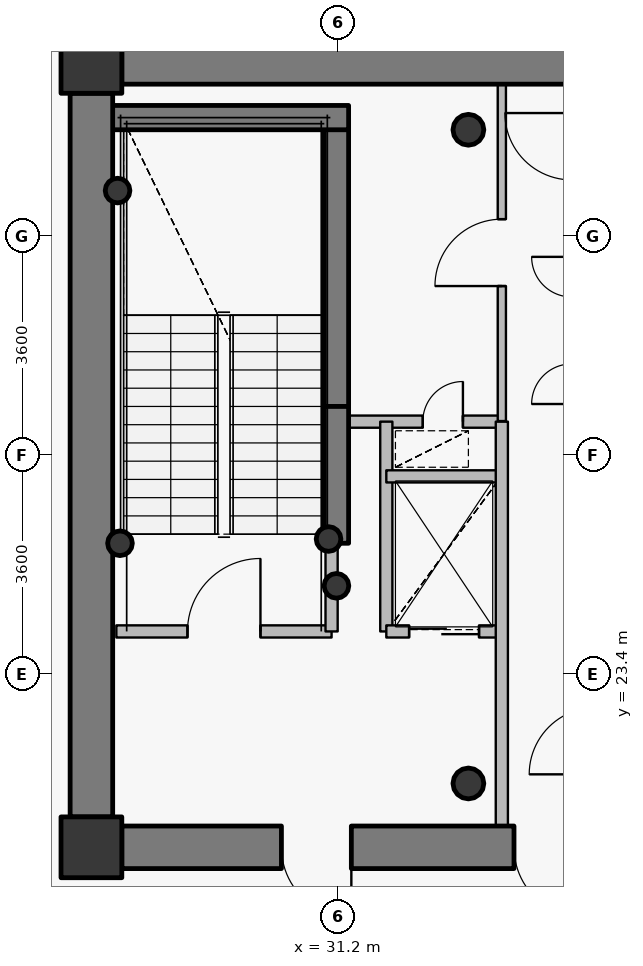
"""IFC4 building model, lengths in metres.
Left out: names, types, materials, properties, quantities, classifications, styles, units other than length and angle.
Written with IfcOpenShell. Run it as: python <this file> out.ifc"""

import sys

from ifc_helpers import new_model, si_unit, direction, frame, frame_2d, origin, origin_2d, place, context, subcontext, project, spatial, rectangle, hollow_circle, extrude, source, transform, mapped, element, fill, save


model = new_model("IFC4")
c1 = context("Model", 3, precision=1e-05, world=origin(), true_north=direction((0.0, 1.0)))
c2 = subcontext(c1, "Body", "Model", "MODEL_VIEW")
j1 = project(units=[si_unit("LENGTHUNIT", "METRE"), si_unit("PLANEANGLEUNIT", "RADIAN")], contexts=[c1])
p1 = place(None, origin())
s1 = spatial("IfcSite", under=j1, at=p1, CompositionType="ELEMENT")
p2 = place(p1, origin())
s2 = spatial("IfcBuilding", under=s1, at=p2, CompositionType="ELEMENT")
p3 = place(p2, frame((0.0, 0.0, 310.5)))
s3 = spatial("IfcBuildingStorey", under=s2, at=p3, CompositionType="ELEMENT", Elevation=310.5)
for number, where, z_axis, x_axis in (
    (1, (27.15, 20.55, 0.0), (0.0, 0.0, 1.0), (1.0, 0.0, 0.0)),
    (2, (27.15, 33.45, 0.0), (0.0, 0.0, 1.0), (1.0, 0.0, 0.0)),
):
    element("IfcColumn", number, at=place(p3, frame(where, z_axis=z_axis, x_axis=x_axis)), inside=s3, PredefinedType="COLUMN", context=c2, shape_type="SweptSolid", body=[
        extrude(rectangle(XDim=1.0, YDim=1.0, at=origin_2d()), origin(), (0.0, 0.0, 1.0), 3.75),
    ])
for number, where, z_axis, x_axis in (
    (3, (33.35, 21.6, 0.0), (0.0, 0.0, 1.0), (1.0, 0.0, 0.0)),
    (4, (33.35, 32.35, 0.0), (0.0, 0.0, 1.0), (1.0, 0.0, 0.0)),
):
    element("IfcColumn", number, at=place(p3, frame(where, z_axis=z_axis, x_axis=x_axis)), inside=s3, PredefinedType="COLUMN", context=c2, shape_type="SweptSolid", body=[
        extrude(hollow_circle(Radius=0.254, WallThickness=0.02, at=origin_2d()), origin(), (0.0, 0.0, 1.0), 3.75),
    ])
p4 = place(p3, frame((31.18, 27.8, 0.0), z_axis=(0.0, 0.0, 1.0), x_axis=(0.0, 1.0, 0.0)))
e5 = element("IfcWall", 5, at=p4, inside=s3, PredefinedType="SHEAR", context=c2, shape_type="SweptSolid", body=[
    extrude(rectangle(XDim=4.75, YDim=0.4, at=frame_2d((2.375, 0.0))), origin(), (0.0, 0.0, 1.0), 3.75),
])
p5 = place(p3, frame((27.25, 32.55, 0.0), z_axis=(0.0, 0.0, 1.0), x_axis=(1.0, 0.0, 0.0)))
e6 = element("IfcWall", 6, at=p5, inside=s3, PredefinedType="SHEAR", context=c2, shape_type="SweptSolid", body=[
    extrude(rectangle(XDim=4.13, YDim=0.4, at=frame_2d((2.065, 0.0))), origin(), (0.0, 0.0, 1.0), 3.75),
])
for number, where, z_axis, x_axis in (
    (7, (27.58, 31.35, 0.0), (0.0, 0.0, 1.0), (1.0, 0.0, 0.0)),
    (8, (31.05, 25.62, 0.0), (0.0, 0.0, 1.0), (1.0, 0.0, 0.0)),
    (9, (31.18, 24.85, 0.0), (0.0, 0.0, 1.0), (1.0, 0.0, 0.0)),
    (10, (27.62, 25.55, 0.0), (0.0, 0.0, 1.0), (1.0, 0.0, 0.0)),
):
    element("IfcColumn", number, at=place(p3, frame(where, z_axis=z_axis, x_axis=x_axis)), inside=s3, PredefinedType="COLUMN", context=c2, shape_type="SweptSolid", body=[
        extrude(hollow_circle(Radius=0.203, WallThickness=0.016, at=origin_2d()), origin(), (0.0, 0.0, 1.0), 3.75),
    ])
p6 = place(p3, frame((27.65, 33.45, 0.0), z_axis=(0.0, 0.0, 1.0), x_axis=(1.0, 0.0, 0.0)))
e11 = element("IfcWall", 11, at=p6, inside=s3, PredefinedType="SHEAR", context=c2, shape_type="SweptSolid", body=[
    extrude(rectangle(XDim=16.7, YDim=0.7, at=frame_2d((8.35, 0.0))), origin(), (0.0, 0.0, 1.0), 3.05),
])
p7 = place(p6, frame((12.775, 0.0, 0.0)))
e12 = element("IfcOpeningElement", 12, at=p7, cuts=e11, PredefinedType="OPENING", context=c2, shape_type="SweptSolid", body=[
    extrude(rectangle(XDim=1.15, YDim=2.15, at=origin_2d()), frame((0.575, 0.36, 1.075), z_axis=(0.0, -1.0, 0.0), x_axis=(1.0, 0.0, 0.0)), (0.0, 0.0, 1.0), 0.72),
])
p8 = place(p3, frame((44.35, 20.55, 0.0), z_axis=(0.0, 0.0, 1.0), x_axis=(-1.0, 0.0, 0.0)))
e13 = element("IfcWall", 13, at=p8, inside=s3, PredefinedType="SHEAR", context=c2, shape_type="SweptSolid", body=[
    extrude(rectangle(XDim=16.7, YDim=0.7, at=frame_2d((8.35, 0.0))), origin(), (0.0, 0.0, 1.0), 3.05),
])
p9 = place(p8, frame((12.925, 0.0, 0.0)))
e14 = element("IfcOpeningElement", 14, at=p9, cuts=e13, PredefinedType="OPENING", context=c2, shape_type="SweptSolid", body=[
    extrude(rectangle(XDim=1.15, YDim=2.15, at=origin_2d()), frame((0.575, 0.36, 1.075), z_axis=(0.0, -1.0, 0.0), x_axis=(1.0, 0.0, 0.0)), (0.0, 0.0, 1.0), 0.72),
])
p10 = place(p8, frame((9.1, 0.0, 0.0)))
e15 = element("IfcOpeningElement", 15, at=p10, cuts=e13, PredefinedType="OPENING", context=c2, shape_type="SweptSolid", body=[
    extrude(rectangle(XDim=1.15, YDim=2.15, at=origin_2d()), frame((0.575, 0.36, 1.075), z_axis=(0.0, -1.0, 0.0), x_axis=(1.0, 0.0, 0.0)), (0.0, 0.0, 1.0), 0.72),
])
p11 = place(p3, frame((27.15, 21.05, 0.0), z_axis=(0.0, 0.0, 1.0), x_axis=(0.0, 1.0, 0.0)))
e16 = element("IfcWall", 16, at=p11, inside=s3, PredefinedType="SHEAR", context=c2, shape_type="SweptSolid", body=[
    extrude(rectangle(XDim=11.9, YDim=0.7, at=frame_2d((5.95, 0.0))), origin(), (0.0, 0.0, 1.0), 3.05),
])
p12 = place(p3, frame((31.18, 25.55, 0.0), z_axis=(0.0, 0.0, 1.0), x_axis=(0.0, 1.0, 0.0)))
e17 = element("IfcWall", 17, at=p12, inside=s3, PredefinedType="SHEAR", context=c2, shape_type="SweptSolid", body=[
    extrude(rectangle(XDim=2.25, YDim=0.4, at=frame_2d((1.125, 0.0))), origin(), (0.0, 0.0, 1.0), 3.1),
])
p13 = place(p3, frame((27.56, 24.1, 0.0), z_axis=(0.0, 0.0, 1.0), x_axis=(1.0, 0.0, 0.0)))
e18 = element("IfcWall", 18, at=p13, inside=s3, PredefinedType="PARTITIONING", context=c2, shape_type="SweptSolid", body=[
    extrude(rectangle(XDim=3.54, YDim=0.2, at=frame_2d((1.77, 0.0))), origin(), (0.0, 0.0, 1.0), 3.5),
])
p14 = place(p13, frame((1.17, 0.0, 0.0)))
e19 = element("IfcOpeningElement", 19, at=p14, cuts=e18, PredefinedType="OPENING", context=c2, shape_type="SweptSolid", body=[
    extrude(rectangle(XDim=1.2, YDim=2.15, at=origin_2d()), frame((0.6, 0.11, 1.075), z_axis=(0.0, -1.0, 0.0), x_axis=(1.0, 0.0, 0.0)), (0.0, 0.0, 1.0), 0.22),
])
p15 = place(p3, frame((31.1, 24.1, 0.0), z_axis=(0.0, 0.0, 1.0), x_axis=(0.0, 1.0, 0.0)))
e20 = element("IfcWall", 20, at=p15, inside=s3, PredefinedType="PARTITIONING", context=c2, shape_type="SweptSolid", body=[
    extrude(rectangle(XDim=1.44, YDim=0.2, at=frame_2d((0.72, 0.0))), origin(), (0.0, 0.0, 1.0), 3.5),
])
p16 = place(p3, frame((31.1, 27.55, 0.0), z_axis=(0.0, 0.0, 1.0), x_axis=(1.0, 0.0, 0.0)))
e21 = element("IfcWall", 21, at=p16, inside=s3, PredefinedType="PARTITIONING", context=c2, shape_type="SweptSolid", body=[
    extrude(rectangle(XDim=2.8, YDim=0.2, at=frame_2d((1.4, 0.0))), origin(), (0.0, 0.0, 1.0), 3.085),
])
p17 = place(p16, frame((1.5, 0.0, 0.0)))
e22 = element("IfcOpeningElement", 22, at=p17, cuts=e21, PredefinedType="OPENING", context=c2, shape_type="SweptSolid", body=[
    extrude(rectangle(XDim=0.66, YDim=2.05, at=origin_2d()), frame((0.33, 0.11, 1.025), z_axis=(0.0, -1.0, 0.0), x_axis=(1.0, 0.0, 0.0)), (0.0, 0.0, 1.0), 0.22),
])
p18 = place(p3, frame((32.0, 24.1, 0.0), z_axis=(0.0, 0.0, 1.0), x_axis=(0.0, 1.0, 0.0)))
e23 = element("IfcWall", 23, at=p18, inside=s3, PredefinedType="PARTITIONING", context=c2, shape_type="SweptSolid", body=[
    extrude(rectangle(XDim=3.45, YDim=0.2, at=frame_2d((1.725, 0.0))), origin(), (0.0, 0.0, 1.0), 3.5),
])
p19 = place(p3, frame((32.0, 24.1, 0.0), z_axis=(0.0, 0.0, 1.0), x_axis=(1.0, 0.0, 0.0)))
e24 = element("IfcWall", 24, at=p19, inside=s3, PredefinedType="PARTITIONING", context=c2, shape_type="SweptSolid", body=[
    extrude(rectangle(XDim=1.9, YDim=0.2, at=frame_2d((0.95, 0.0))), origin(), (0.0, 0.0, 1.0), 3.085),
])
p20 = place(p19, frame((0.375, 0.0, 0.0)))
e25 = element("IfcOpeningElement", 25, at=p20, cuts=e24, PredefinedType="OPENING", context=c2, shape_type="SweptSolid", body=[
    extrude(rectangle(XDim=1.15, YDim=2.15, at=origin_2d()), frame((0.575, 0.11, 1.075), z_axis=(0.0, -1.0, 0.0), x_axis=(1.0, 0.0, 0.0)), (0.0, 0.0, 1.0), 0.22),
])
p21 = place(p3, frame((32.0, 26.65, 0.0), z_axis=(0.0, 0.0, 1.0), x_axis=(1.0, 0.0, 0.0)))
e26 = element("IfcWall", 26, at=p21, inside=s3, PredefinedType="PARTITIONING", context=c2, shape_type="SweptSolid", body=[
    extrude(rectangle(XDim=1.9, YDim=0.2, at=frame_2d((0.95, 0.0))), origin(), (0.0, 0.0, 1.0), 3.085),
])
p22 = place(p3, frame((33.9, 20.9, 0.0), z_axis=(0.0, 0.0, 1.0), x_axis=(0.0, 1.0, 0.0)))
e27 = element("IfcWall", 27, at=p22, inside=s3, PredefinedType="PARTITIONING", context=c2, shape_type="SweptSolid", body=[
    extrude(rectangle(XDim=6.65, YDim=0.2, at=frame_2d((3.325, 0.0))), origin(), (0.0, 0.0, 1.0), 3.085),
])
p23 = place(p3, frame((33.9, 27.56, 0.0), z_axis=(0.0, 0.0, 1.0), x_axis=(0.0, 1.0, 0.0)))
e28 = element("IfcWall", 28, at=p23, inside=s3, PredefinedType="PARTITIONING", context=c2, shape_type="SweptSolid", body=[
    extrude(rectangle(XDim=5.54, YDim=0.135, at=frame_2d((2.77, 0.0))), origin(), (0.0, 0.0, 1.0), 3.085),
])
p24 = place(p23, frame((2.22, 0.0, 0.0)))
e29 = element("IfcOpeningElement", 29, at=p24, cuts=e28, PredefinedType="OPENING", context=c2, shape_type="SweptSolid", body=[
    extrude(rectangle(XDim=1.1, YDim=2.15, at=origin_2d()), frame((0.55, 0.078, 1.075), z_axis=(0.0, -1.0, 0.0), x_axis=(1.0, 0.0, 0.0)), (0.0, 0.0, 1.0), 0.155),
])
p25 = place(p3, frame((26.8, 33.492, 0.0), z_axis=(0.0, 0.0, 1.0), x_axis=(0.0, -1.0, 0.0)))
e30 = element("IfcWall", 30, at=p25, inside=s3, PredefinedType="PARTITIONING", context=c2, shape_type="SweptSolid", body=[
    extrude(rectangle(XDim=0.532, YDim=0.135, at=frame_2d((0.266, 0.0))), origin(), (0.0, 0.0, 1.0), 3.5),
])
p26 = place(p3, frame((26.8, 21.04, 0.0), z_axis=(0.0, 0.0, 1.0), x_axis=(0.0, -1.0, 0.0)))
e31 = element("IfcWall", 31, at=p26, inside=s3, PredefinedType="PARTITIONING", context=c2, shape_type="SweptSolid", body=[
    extrude(rectangle(XDim=0.84, YDim=0.135, at=frame_2d((0.42, 0.0))), origin(), (0.0, 0.0, 1.0), 3.035),
])
p27 = place(p3, frame((27.107, 20.2, 0.0), z_axis=(0.0, 0.0, 1.0), x_axis=(1.0, 0.0, 0.0)))
e32 = element("IfcWall", 32, at=p27, inside=s3, PredefinedType="PARTITIONING", context=c2, shape_type="SweptSolid", body=[
    extrude(rectangle(XDim=0.532, YDim=0.135, at=frame_2d((0.266, 0.0))), origin(), (0.0, 0.0, 1.0), 3.035),
])
m1 = source(origin(), c2, "Body", "SweptSolid", [
    extrude(rectangle(XDim=1.15, YDim=2.15, at=origin_2d()), frame((0.575, 0.025, 1.075), z_axis=(0.0, -1.0, 0.0), x_axis=(1.0, 0.0, 0.0)), (0.0, 0.0, 1.0), 0.05),
])
p28 = place(p9, origin())
e33 = element("IfcDoor", 33, at=p28, inside=s3, OperationType="SINGLE_SWING_LEFT", PredefinedType="DOOR", context=c2, shape_type="MappedRepresentation", body=[
    mapped(m1, transform((0.0, 0.0, 0.0), x_axis=(1.0, 0.0, 0.0), y_axis=(0.0, 1.0, 0.0), z_axis=(0.0, 0.0, 1.0), scale=1.0)),
])
fill(e14, e33)
p29 = place(p10, origin())
e34 = element("IfcDoor", 34, at=p29, inside=s3, OperationType="SINGLE_SWING_LEFT", PredefinedType="DOOR", context=c2, shape_type="MappedRepresentation", body=[
    mapped(m1, transform((0.0, 0.0, 0.0), x_axis=(1.0, 0.0, 0.0), y_axis=(0.0, 1.0, 0.0), z_axis=(0.0, 0.0, 1.0), scale=1.0)),
])
fill(e15, e34)
m2 = source(origin(), c2, "Body", "SweptSolid", [
    extrude(rectangle(XDim=1.2, YDim=2.15, at=origin_2d()), frame((0.6, 0.025, 1.075), z_axis=(0.0, -1.0, 0.0), x_axis=(1.0, 0.0, 0.0)), (0.0, 0.0, 1.0), 0.05),
])
p30 = place(p14, origin())
e35 = element("IfcDoor", 35, at=p30, inside=s3, OperationType="SINGLE_SWING_RIGHT", PredefinedType="DOOR", context=c2, shape_type="MappedRepresentation", body=[
    mapped(m2, transform((0.0, 0.0, 0.0), x_axis=(1.0, 0.0, 0.0), y_axis=(0.0, 1.0, 0.0), z_axis=(0.0, 0.0, 1.0), scale=1.0)),
])
fill(e19, e35)
m3 = source(origin(), c2, "Body", "SweptSolid", [
    extrude(rectangle(XDim=1.15, YDim=2.15, at=origin_2d()), frame((0.575, 0.025, 1.075), z_axis=(0.0, -1.0, 0.0), x_axis=(1.0, 0.0, 0.0)), (0.0, 0.0, 1.0), 0.05),
])
p31 = place(p20, origin())
e36 = element("IfcDoor", 36, at=p31, inside=s3, OperationType="DOUBLE_DOOR_SLIDING", PredefinedType="USERDEFINED", context=c2, shape_type="MappedRepresentation", body=[
    mapped(m3, transform((0.0, 0.0, 0.0), x_axis=(1.0, 0.0, 0.0), y_axis=(0.0, 1.0, 0.0), z_axis=(0.0, 0.0, 1.0), scale=1.0)),
])
fill(e25, e36)
m4 = source(origin(), c2, "Body", "SweptSolid", [
    extrude(rectangle(XDim=1.1, YDim=2.15, at=origin_2d()), frame((0.55, 0.025, 1.075), z_axis=(0.0, -1.0, 0.0), x_axis=(1.0, 0.0, 0.0)), (0.0, 0.0, 1.0), 0.05),
])
p32 = place(p24, origin())
e37 = element("IfcDoor", 37, at=p32, inside=s3, OperationType="SINGLE_SWING_LEFT", PredefinedType="DOOR", context=c2, shape_type="MappedRepresentation", body=[
    mapped(m4, transform((0.0, 0.0, 0.0), x_axis=(1.0, 0.0, 0.0), y_axis=(0.0, 1.0, 0.0), z_axis=(0.0, 0.0, 1.0), scale=1.0)),
])
fill(e29, e37)
m5 = source(origin(), c2, "Body", "SweptSolid", [
    extrude(rectangle(XDim=0.66, YDim=2.05, at=origin_2d()), frame((0.33, 0.025, 1.025), z_axis=(0.0, -1.0, 0.0), x_axis=(1.0, 0.0, 0.0)), (0.0, 0.0, 1.0), 0.05),
])
p33 = place(p17, origin())
e38 = element("IfcDoor", 38, at=p33, inside=s3, OperationType="SINGLE_SWING_RIGHT", PredefinedType="USERDEFINED", context=c2, shape_type="MappedRepresentation", body=[
    mapped(m5, transform((0.0, 0.0, 0.0), x_axis=(1.0, 0.0, 0.0), y_axis=(0.0, 1.0, 0.0), z_axis=(0.0, 0.0, 1.0), scale=1.0)),
])
fill(e22, e38)
save(model, sys.argv[1])
